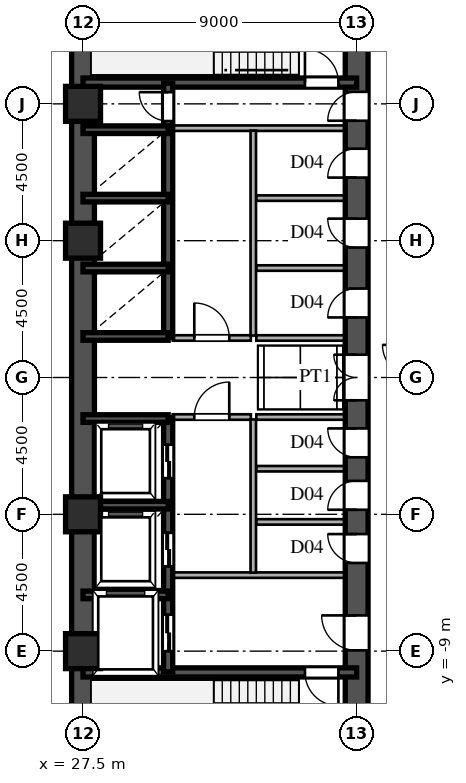
"""IFC4 building model, lengths in metres.
Left out: names, types, materials, properties, quantities, classifications, styles, units other than length and angle.
Written with IfcOpenShell. Run it as: python <this file> out.ifc"""

import sys

from ifc_helpers import new_model, si_unit, direction, frame, frame_2d, origin, origin_2d, place, context, subcontext, project, spatial, rectangle, hollow_rectangle, extrude, source, transform, mapped, element, fill, save


model = new_model("IFC4")
c1 = context("Model", 3, precision=1e-05, world=origin(), true_north=direction((0.0, 1.0)))
c2 = subcontext(c1, "Body", "Model", "MODEL_VIEW")
j1 = project(units=[si_unit("LENGTHUNIT", "METRE"), si_unit("PLANEANGLEUNIT", "RADIAN")], contexts=[c1])
p1 = place(None, origin())
s1 = spatial("IfcSite", under=j1, at=p1, CompositionType="ELEMENT")
p2 = place(p1, origin())
s2 = spatial("IfcBuilding", under=s1, at=p2, CompositionType="ELEMENT")
p3 = place(p2, frame((0.0, 0.0, 33.3)))
s3 = spatial("IfcBuildingStorey", under=s2, at=p3, CompositionType="ELEMENT", Elevation=33.3)
m1 = source(origin(), c2, "Body", "SweptSolid", [
    extrude(hollow_rectangle(XDim=1.15, YDim=1.15, WallThickness=0.048, at=origin_2d()), origin(), (0.0, 0.0, 1.0), 3.6),
])
for number, where, z_axis, x_axis in (
    (1, (27.5, -9.0, 0.0), (0.0, 0.0, 1.0), (1.0, 0.0, 0.0)),
    (2, (27.5, -4.5, 0.0), (0.0, 0.0, 1.0), (1.0, 0.0, 0.0)),
    (3, (27.5, 4.5, 0.0), (0.0, 0.0, 1.0), (1.0, 0.0, 0.0)),
    (4, (27.5, 9.0, 0.0), (0.0, 0.0, 1.0), (1.0, 0.0, 0.0)),
):
    element("IfcColumn", number, at=place(p3, frame(where, z_axis=z_axis, x_axis=x_axis)), inside=s3, PredefinedType="COLUMN", context=c2, shape_type="MappedRepresentation", body=[
        mapped(m1, transform((0.0, 0.0, 0.0), scale=1.0)),
    ])
for number, where, z_axis, x_axis in (
    (5, (27.5, -13.5, 0.0), (0.0, 0.0, 1.0), (0.0, 1.0, 0.0)),
    (6, (27.5, 1.3, 0.0), (0.0, 0.0, 1.0), (0.0, 1.0, 0.0)),
):
    element("IfcWall", number, at=place(p3, frame(where, z_axis=z_axis, x_axis=x_axis)), inside=s3, PredefinedType="SHEAR", context=c2, shape_type="SweptSolid", body=[
        extrude(rectangle(XDim=12.2, YDim=0.75, at=frame_2d((6.1, 0.0))), origin(), (0.0, 0.0, 1.0), 3.38),
    ])
p4 = place(p3, frame((27.5, -1.3, 0.0), z_axis=(0.0, 0.0, 1.0), x_axis=(0.0, 1.0, 0.0)))
e7 = element("IfcWall", 7, at=p4, inside=s3, PredefinedType="SHEAR", context=c2, shape_type="SweptSolid", body=[
    extrude(rectangle(XDim=2.6, YDim=0.75, at=frame_2d((1.3, 0.0))), origin(), (0.0, 0.0, 1.0), 3.38),
])
p5 = place(p3, frame((36.5, -13.65, 0.0), z_axis=(0.0, 0.0, 1.0), x_axis=(0.0, 1.0, 0.0)))
e8 = element("IfcWall", 8, at=p5, inside=s3, PredefinedType="SHEAR", context=c2, shape_type="SweptSolid", body=[
    extrude(rectangle(XDim=7.15, YDim=0.75, at=frame_2d((3.575, 0.0))), origin(), (0.0, 0.0, 1.0), 3.38),
])
p6 = place(p5, frame((4.675, 0.0, 0.0)))
e9 = element("IfcOpeningElement", 9, at=p6, cuts=e8, PredefinedType="OPENING", context=c2, shape_type="SweptSolid", body=[
    extrude(rectangle(XDim=1.15, YDim=2.2, at=frame_2d((0.575, 1.1))), frame((0.0, 0.385, 0.0), z_axis=(0.0, -1.0, 0.0), x_axis=(1.0, 0.0, 0.0)), (0.0, 0.0, 1.0), 0.77),
])
p7 = place(p3, frame((36.5, -1.3, 0.0), z_axis=(0.0, 0.0, 1.0), x_axis=(0.0, 1.0, 0.0)))
e10 = element("IfcWall", 10, at=p7, inside=s3, PredefinedType="SHEAR", context=c2, shape_type="SweptSolid", body=[
    extrude(rectangle(XDim=2.6, YDim=0.75, at=frame_2d((1.3, 0.0))), origin(), (0.0, 0.0, 1.0), 3.38),
])
p8 = place(p7, frame((0.55, 0.0, 0.0)))
e11 = element("IfcOpeningElement", 11, at=p8, cuts=e10, PredefinedType="OPENING", context=c2, shape_type="SweptSolid", body=[
    extrude(rectangle(XDim=1.5, YDim=2.3, at=frame_2d((0.75, 1.15))), frame((0.0, 0.385, 0.0), z_axis=(0.0, -1.0, 0.0), x_axis=(1.0, 0.0, 0.0)), (0.0, 0.0, 1.0), 0.77),
])
p9 = place(p3, frame((36.5, 8.2, 0.0), z_axis=(0.0, 0.0, 1.0), x_axis=(0.0, 1.0, 0.0)))
e12 = element("IfcWall", 12, at=p9, inside=s3, PredefinedType="SHEAR", context=c2, shape_type="SweptSolid", body=[
    extrude(rectangle(XDim=5.45, YDim=0.75, at=frame_2d((2.725, 0.0))), origin(), (0.0, 0.0, 1.0), 3.38),
])
p10 = place(p9, frame((0.245, 0.0, 0.0)))
e13 = element("IfcOpeningElement", 13, at=p10, cuts=e12, PredefinedType="OPENING", context=c2, shape_type="SweptSolid", body=[
    extrude(rectangle(XDim=0.95, YDim=2.15, at=frame_2d((0.475, 1.075))), frame((0.0, 0.385, 0.0), z_axis=(0.0, -1.0, 0.0), x_axis=(1.0, 0.0, 0.0)), (0.0, 0.0, 1.0), 0.77),
])
p11 = place(p3, frame((36.5, -6.5, 0.0), z_axis=(0.0, 0.0, 1.0), x_axis=(0.0, 1.0, 0.0)))
e14 = element("IfcWall", 14, at=p11, inside=s3, PredefinedType="SHEAR", context=c2, shape_type="SweptSolid", body=[
    extrude(rectangle(XDim=1.75, YDim=0.75, at=frame_2d((0.875, 0.0))), origin(), (0.0, 0.0, 1.0), 3.38),
])
p12 = place(p11, frame((0.4, 0.0, 0.0)))
e15 = element("IfcOpeningElement", 15, at=p12, cuts=e14, PredefinedType="OPENING", context=c2, shape_type="SweptSolid", body=[
    extrude(rectangle(XDim=0.95, YDim=2.15, at=frame_2d((0.475, 1.075))), frame((0.0, 0.385, 0.0), z_axis=(0.0, -1.0, 0.0), x_axis=(1.0, 0.0, 0.0)), (0.0, 0.0, 1.0), 0.77),
])
p13 = place(p3, frame((36.5, -4.75, 0.0), z_axis=(0.0, 0.0, 1.0), x_axis=(0.0, 1.0, 0.0)))
e16 = element("IfcWall", 16, at=p13, inside=s3, PredefinedType="SHEAR", context=c2, shape_type="SweptSolid", body=[
    extrude(rectangle(XDim=1.75, YDim=0.75, at=frame_2d((0.875, 0.0))), origin(), (0.0, 0.0, 1.0), 3.38),
])
p14 = place(p13, frame((0.4, 0.0, 0.0)))
e17 = element("IfcOpeningElement", 17, at=p14, cuts=e16, PredefinedType="OPENING", context=c2, shape_type="SweptSolid", body=[
    extrude(rectangle(XDim=0.95, YDim=2.15, at=frame_2d((0.475, 1.075))), frame((0.0, 0.385, 0.0), z_axis=(0.0, -1.0, 0.0), x_axis=(1.0, 0.0, 0.0)), (0.0, 0.0, 1.0), 0.77),
])
p15 = place(p3, frame((36.5, -3.0, 0.0), z_axis=(0.0, 0.0, 1.0), x_axis=(0.0, 1.0, 0.0)))
e18 = element("IfcWall", 18, at=p15, inside=s3, PredefinedType="SHEAR", context=c2, shape_type="SweptSolid", body=[
    extrude(rectangle(XDim=1.7, YDim=0.75, at=frame_2d((0.85, 0.0))), origin(), (0.0, 0.0, 1.0), 3.38),
])
p16 = place(p15, frame((0.375, 0.0, 0.0)))
e19 = element("IfcOpeningElement", 19, at=p16, cuts=e18, PredefinedType="OPENING", context=c2, shape_type="SweptSolid", body=[
    extrude(rectangle(XDim=0.95, YDim=2.15, at=frame_2d((0.475, 1.075))), frame((0.0, 0.385, 0.0), z_axis=(0.0, -1.0, 0.0), x_axis=(1.0, 0.0, 0.0)), (0.0, 0.0, 1.0), 0.77),
])
p17 = place(p3, frame((36.5, 1.3, 0.0), z_axis=(0.0, 0.0, 1.0), x_axis=(0.0, 1.0, 0.0)))
e20 = element("IfcWall", 20, at=p17, inside=s3, PredefinedType="SHEAR", context=c2, shape_type="SweptSolid", body=[
    extrude(rectangle(XDim=2.3, YDim=0.75, at=frame_2d((1.15, 0.0))), origin(), (0.0, 0.0, 1.0), 3.38),
])
p18 = place(p17, frame((0.675, 0.0, 0.0)))
e21 = element("IfcOpeningElement", 21, at=p18, cuts=e20, PredefinedType="OPENING", context=c2, shape_type="SweptSolid", body=[
    extrude(rectangle(XDim=0.95, YDim=2.15, at=frame_2d((0.475, 1.075))), frame((0.0, 0.385, 0.0), z_axis=(0.0, -1.0, 0.0), x_axis=(1.0, 0.0, 0.0)), (0.0, 0.0, 1.0), 0.77),
])
p19 = place(p3, frame((36.5, 3.6, 0.0), z_axis=(0.0, 0.0, 1.0), x_axis=(0.0, 1.0, 0.0)))
e22 = element("IfcWall", 22, at=p19, inside=s3, PredefinedType="SHEAR", context=c2, shape_type="SweptSolid", body=[
    extrude(rectangle(XDim=2.3, YDim=0.75, at=frame_2d((1.15, 0.0))), origin(), (0.0, 0.0, 1.0), 3.38),
])
p20 = place(p19, frame((0.675, 0.0, 0.0)))
e23 = element("IfcOpeningElement", 23, at=p20, cuts=e22, PredefinedType="OPENING", context=c2, shape_type="SweptSolid", body=[
    extrude(rectangle(XDim=0.95, YDim=2.15, at=frame_2d((0.475, 1.075))), frame((0.0, 0.385, 0.0), z_axis=(0.0, -1.0, 0.0), x_axis=(1.0, 0.0, 0.0)), (0.0, 0.0, 1.0), 0.77),
])
p21 = place(p3, frame((36.5, 5.9, 0.0), z_axis=(0.0, 0.0, 1.0), x_axis=(0.0, 1.0, 0.0)))
e24 = element("IfcWall", 24, at=p21, inside=s3, PredefinedType="SHEAR", context=c2, shape_type="SweptSolid", body=[
    extrude(rectangle(XDim=2.3, YDim=0.75, at=frame_2d((1.15, 0.0))), origin(), (0.0, 0.0, 1.0), 3.38),
])
p22 = place(p21, frame((0.675, 0.0, 0.0)))
e25 = element("IfcOpeningElement", 25, at=p22, cuts=e24, PredefinedType="OPENING", context=c2, shape_type="SweptSolid", body=[
    extrude(rectangle(XDim=0.95, YDim=2.15, at=frame_2d((0.475, 1.075))), frame((0.0, 0.385, 0.0), z_axis=(0.0, -1.0, 0.0), x_axis=(1.0, 0.0, 0.0)), (0.0, 0.0, 1.0), 0.77),
])
p23 = place(p3, frame((27.5, -9.7, 0.0), z_axis=(0.0, 0.0, 1.0), x_axis=(1.0, 0.0, 0.0)))
e26 = element("IfcWall", 26, at=p23, inside=s3, PredefinedType="SHEAR", context=c2, shape_type="SweptSolid", body=[
    extrude(rectangle(XDim=9.0, YDim=0.3, at=frame_2d((4.5, 0.0))), origin(), (0.0, 0.0, 1.0), 3.38),
])
p24 = place(p23, frame((7.3, 0.0, 0.0)))
e27 = element("IfcOpeningElement", 27, at=p24, cuts=e26, PredefinedType="OPENING", context=c2, shape_type="SweptSolid", body=[
    extrude(rectangle(XDim=1.1, YDim=2.2, at=frame_2d((0.55, 1.1))), frame((0.0, 0.16, 0.0), z_axis=(0.0, -1.0, 0.0), x_axis=(1.0, 0.0, 0.0)), (0.0, 0.0, 1.0), 0.32),
])
p25 = place(p3, frame((27.5, 9.7, 0.0), z_axis=(0.0, 0.0, 1.0), x_axis=(1.0, 0.0, 0.0)))
e28 = element("IfcWall", 28, at=p25, inside=s3, PredefinedType="SHEAR", context=c2, shape_type="SweptSolid", body=[
    extrude(rectangle(XDim=9.0, YDim=0.3, at=frame_2d((4.5, 0.0))), origin(), (0.0, 0.0, 1.0), 3.38),
])
p26 = place(p25, frame((7.3, 0.0, 0.0)))
e29 = element("IfcOpeningElement", 29, at=p26, cuts=e28, PredefinedType="OPENING", context=c2, shape_type="SweptSolid", body=[
    extrude(rectangle(XDim=1.1, YDim=2.2, at=frame_2d((0.55, 1.1))), frame((0.0, 0.16, 0.0), z_axis=(0.0, -1.0, 0.0), x_axis=(1.0, 0.0, 0.0)), (0.0, 0.0, 1.0), 0.32),
])
for number, where, z_axis, x_axis in (
    (30, (27.5, -7.15, 0.0), (0.0, 0.0, 1.0), (1.0, 0.0, 0.0)),
    (31, (27.5, -4.2, 0.0), (0.0, 0.0, 1.0), (1.0, 0.0, 0.0)),
    (32, (27.5, -1.35, 0.0), (0.0, 0.0, 1.0), (1.0, 0.0, 0.0)),
    (33, (27.5, 1.35, 0.0), (0.0, 0.0, 1.0), (1.0, 0.0, 0.0)),
    (34, (27.5, 3.6, 0.0), (0.0, 0.0, 1.0), (1.0, 0.0, 0.0)),
    (35, (27.5, 5.9, 0.0), (0.0, 0.0, 1.0), (1.0, 0.0, 0.0)),
    (36, (27.5, 8.15, 0.0), (0.0, 0.0, 1.0), (1.0, 0.0, 0.0)),
):
    element("IfcWall", number, at=place(p3, frame(where, z_axis=z_axis, x_axis=x_axis)), inside=s3, PredefinedType="SHEAR", context=c2, shape_type="SweptSolid", body=[
        extrude(rectangle(XDim=2.8, YDim=0.25, at=frame_2d((1.4, 0.0))), origin(), (0.0, 0.0, 1.0), 3.38),
    ])
p27 = place(p3, frame((30.3, -9.68, 0.0), z_axis=(0.0, 0.0, 1.0), x_axis=(0.0, 1.0, 0.0)))
e37 = element("IfcWall", 37, at=p27, inside=s3, PredefinedType="SHEAR", context=c2, shape_type="SweptSolid", body=[
    extrude(rectangle(XDim=2.56, YDim=0.3, at=frame_2d((1.28, 0.0))), origin(), (0.0, 0.0, 1.0), 3.38),
])
p28 = place(p27, frame((0.68, 0.0, 0.0)))
e38 = element("IfcOpeningElement", 38, at=p28, cuts=e37, PredefinedType="OPENING", context=c2, shape_type="SweptSolid", body=[
    extrude(rectangle(XDim=1.2, YDim=2.25, at=frame_2d((0.6, 1.125))), frame((0.0, 0.16, 0.0), z_axis=(0.0, -1.0, 0.0), x_axis=(1.0, 0.0, 0.0)), (0.0, 0.0, 1.0), 0.32),
])
p29 = place(p3, frame((30.3, -7.12, 0.0), z_axis=(0.0, 0.0, 1.0), x_axis=(0.0, 1.0, 0.0)))
e39 = element("IfcWall", 39, at=p29, inside=s3, PredefinedType="SHEAR", context=c2, shape_type="SweptSolid", body=[
    extrude(rectangle(XDim=2.92, YDim=0.3, at=frame_2d((1.46, 0.0))), origin(), (0.0, 0.0, 1.0), 3.38),
])
p30 = place(p29, frame((0.91, 0.0, 0.0)))
e40 = element("IfcOpeningElement", 40, at=p30, cuts=e39, PredefinedType="OPENING", context=c2, shape_type="SweptSolid", body=[
    extrude(rectangle(XDim=1.1, YDim=2.2, at=frame_2d((0.55, 1.1))), frame((0.0, 0.16, 0.0), z_axis=(0.0, -1.0, 0.0), x_axis=(1.0, 0.0, 0.0)), (0.0, 0.0, 1.0), 0.32),
])
p31 = place(p3, frame((30.3, -4.2, 0.0), z_axis=(0.0, 0.0, 1.0), x_axis=(0.0, 1.0, 0.0)))
e41 = element("IfcWall", 41, at=p31, inside=s3, PredefinedType="SHEAR", context=c2, shape_type="SweptSolid", body=[
    extrude(rectangle(XDim=2.88, YDim=0.3, at=frame_2d((1.44, 0.0))), origin(), (0.0, 0.0, 1.0), 3.38),
])
p32 = place(p31, frame((0.89, 0.0, 0.0)))
e42 = element("IfcOpeningElement", 42, at=p32, cuts=e41, PredefinedType="OPENING", context=c2, shape_type="SweptSolid", body=[
    extrude(rectangle(XDim=1.1, YDim=2.2, at=frame_2d((0.55, 1.1))), frame((0.0, 0.16, 0.0), z_axis=(0.0, -1.0, 0.0), x_axis=(1.0, 0.0, 0.0)), (0.0, 0.0, 1.0), 0.32),
])
p33 = place(p3, frame((30.3, 1.32, 0.0), z_axis=(0.0, 0.0, 1.0), x_axis=(0.0, 1.0, 0.0)))
e43 = element("IfcWall", 43, at=p33, inside=s3, PredefinedType="SHEAR", context=c2, shape_type="SweptSolid", body=[
    extrude(rectangle(XDim=2.28, YDim=0.3, at=frame_2d((1.14, 0.0))), origin(), (0.0, 0.0, 1.0), 3.38),
])
p34 = place(p3, frame((30.3, 3.6, 0.0), z_axis=(0.0, 0.0, 1.0), x_axis=(0.0, 1.0, 0.0)))
e44 = element("IfcWall", 44, at=p34, inside=s3, PredefinedType="SHEAR", context=c2, shape_type="SweptSolid", body=[
    extrude(rectangle(XDim=2.3, YDim=0.3, at=frame_2d((1.15, 0.0))), origin(), (0.0, 0.0, 1.0), 3.38),
])
p35 = place(p3, frame((30.3, 5.9, 0.0), z_axis=(0.0, 0.0, 1.0), x_axis=(0.0, 1.0, 0.0)))
e45 = element("IfcWall", 45, at=p35, inside=s3, PredefinedType="SHEAR", context=c2, shape_type="SweptSolid", body=[
    extrude(rectangle(XDim=2.25, YDim=0.3, at=frame_2d((1.125, 0.0))), origin(), (0.0, 0.0, 1.0), 3.38),
])
p36 = place(p3, frame((30.3, 8.15, 0.0), z_axis=(0.0, 0.0, 1.0), x_axis=(0.0, 1.0, 0.0)))
e46 = element("IfcWall", 46, at=p36, inside=s3, PredefinedType="SHEAR", context=c2, shape_type="SweptSolid", body=[
    extrude(rectangle(XDim=1.53, YDim=0.3, at=frame_2d((0.765, 0.0))), origin(), (0.0, 0.0, 1.0), 3.38),
])
p37 = place(p36, frame((0.285, 0.0, 0.0)))
e47 = element("IfcOpeningElement", 47, at=p37, cuts=e46, PredefinedType="OPENING", context=c2, shape_type="SweptSolid", body=[
    extrude(rectangle(XDim=0.95, YDim=2.15, at=frame_2d((0.475, 1.075))), frame((0.0, 0.16, 0.0), z_axis=(0.0, -1.0, 0.0), x_axis=(1.0, 0.0, 0.0)), (0.0, 0.0, 1.0), 0.32),
])
for number, where, z_axis, x_axis in (
    (48, (30.45, -6.5, 0.0), (0.0, 0.0, 1.0), (1.0, 0.0, 0.0)),
    (49, (30.45, 8.2, 0.0), (0.0, 0.0, 1.0), (1.0, 0.0, 0.0)),
):
    element("IfcWall", number, at=place(p3, frame(where, z_axis=z_axis, x_axis=x_axis)), inside=s3, PredefinedType="PARTITIONING", context=c2, shape_type="SweptSolid", body=[
        extrude(rectangle(XDim=5.7, YDim=0.18, at=frame_2d((2.85, 0.0))), origin(), (0.0, 0.0, 1.0), 3.38),
    ])
p38 = place(p3, frame((33.1, -6.42, 0.0), z_axis=(0.0, 0.0, 1.0), x_axis=(0.0, 1.0, 0.0)))
e50 = element("IfcWall", 50, at=p38, inside=s3, PredefinedType="PARTITIONING", context=c2, shape_type="SweptSolid", body=[
    extrude(rectangle(XDim=5.04, YDim=0.18, at=frame_2d((2.52, 0.0))), origin(), (0.0, 0.0, 1.0), 3.38),
])
p39 = place(p3, frame((33.1, 1.38, 0.0), z_axis=(0.0, 0.0, 1.0), x_axis=(0.0, 1.0, 0.0)))
e51 = element("IfcWall", 51, at=p39, inside=s3, PredefinedType="PARTITIONING", context=c2, shape_type="SweptSolid", body=[
    extrude(rectangle(XDim=6.74, YDim=0.18, at=frame_2d((3.37, 0.0))), origin(), (0.0, 0.0, 1.0), 3.38),
])
p40 = place(p3, frame((30.45, -1.3, 0.0), z_axis=(0.0, 0.0, 1.0), x_axis=(1.0, 0.0, 0.0)))
e52 = element("IfcWall", 52, at=p40, inside=s3, PredefinedType="PARTITIONING", context=c2, shape_type="SweptSolid", body=[
    extrude(rectangle(XDim=2.57, YDim=0.18, at=frame_2d((1.285, 0.0))), origin(), (0.0, 0.0, 1.0), 3.38),
])
p41 = place(p40, frame((0.71, 0.0, 0.0)))
e53 = element("IfcOpeningElement", 53, at=p41, cuts=e52, PredefinedType="OPENING", context=c2, shape_type="SweptSolid", body=[
    extrude(rectangle(XDim=1.15, YDim=2.2, at=frame_2d((0.575, 1.1))), frame((0.0, 0.1, 0.0), z_axis=(0.0, -1.0, 0.0), x_axis=(1.0, 0.0, 0.0)), (0.0, 0.0, 1.0), 0.2),
])
p42 = place(p3, frame((30.45, 1.3, 0.0), z_axis=(0.0, 0.0, 1.0), x_axis=(1.0, 0.0, 0.0)))
e54 = element("IfcWall", 54, at=p42, inside=s3, PredefinedType="PARTITIONING", context=c2, shape_type="SweptSolid", body=[
    extrude(rectangle(XDim=2.57, YDim=0.18, at=frame_2d((1.285, 0.0))), origin(), (0.0, 0.0, 1.0), 3.38),
])
p43 = place(p42, frame((0.71, 0.0, 0.0)))
e55 = element("IfcOpeningElement", 55, at=p43, cuts=e54, PredefinedType="OPENING", context=c2, shape_type="SweptSolid", body=[
    extrude(rectangle(XDim=1.15, YDim=2.2, at=frame_2d((0.575, 1.1))), frame((0.0, 0.1, 0.0), z_axis=(0.0, -1.0, 0.0), x_axis=(1.0, 0.0, 0.0)), (0.0, 0.0, 1.0), 0.2),
])
for number, where, z_axis, x_axis in (
    (56, (33.2, -1.3, 0.0), (0.0, 0.0, 1.0), (1.0, 0.0, 0.0)),
    (57, (33.2, 1.3, 0.0), (0.0, 0.0, 1.0), (1.0, 0.0, 0.0)),
    (58, (33.2, -4.75, 0.0), (0.0, 0.0, 1.0), (1.0, 0.0, 0.0)),
    (59, (33.2, -3.0, 0.0), (0.0, 0.0, 1.0), (1.0, 0.0, 0.0)),
    (60, (33.2, 3.6, 0.0), (0.0, 0.0, 1.0), (1.0, 0.0, 0.0)),
    (61, (33.2, 5.9, 0.0), (0.0, 0.0, 1.0), (1.0, 0.0, 0.0)),
):
    element("IfcWall", number, at=place(p3, frame(where, z_axis=z_axis, x_axis=x_axis)), inside=s3, PredefinedType="PARTITIONING", context=c2, shape_type="SweptSolid", body=[
        extrude(rectangle(XDim=2.95, YDim=0.18, at=frame_2d((1.475, 0.0))), origin(), (0.0, 0.0, 1.0), 3.38),
    ])
m2 = source(origin(), c2, "Body", "SweptSolid", [
    extrude(rectangle(XDim=1.15, YDim=2.2, at=frame_2d((0.575, 1.1))), frame((0.0, 0.025, 0.0), z_axis=(0.0, -1.0, 0.0), x_axis=(1.0, 0.0, 0.0)), (0.0, 0.0, 1.0), 0.05),
])
p44 = place(p6, origin())
e62 = element("IfcDoor", 62, at=p44, inside=s3, OperationType="SINGLE_SWING_RIGHT", PredefinedType="DOOR", context=c2, shape_type="MappedRepresentation", body=[
    mapped(m2, transform((0.0, 0.0, 0.0), scale=1.0)),
])
fill(e9, e62)
m3 = source(origin(), c2, "Body", "SweptSolid", [
    extrude(rectangle(XDim=1.5, YDim=2.3, at=frame_2d((0.75, 1.15))), frame((0.0, 0.025, 0.0), z_axis=(0.0, -1.0, 0.0), x_axis=(1.0, 0.0, 0.0)), (0.0, 0.0, 1.0), 0.05),
])
p45 = place(p8, origin())
e63 = element("IfcDoor", 63, at=p45, inside=s3, OperationType="DOUBLE_SWING_LEFT", PredefinedType="DOOR", context=c2, shape_type="MappedRepresentation", body=[
    mapped(m3, transform((0.0, 0.0, 0.0), scale=1.0)),
])
fill(e11, e63)
m4 = source(origin(), c2, "Body", "SweptSolid", [
    extrude(rectangle(XDim=0.95, YDim=2.15, at=frame_2d((0.475, 1.075))), frame((0.0, 0.025, 0.0), z_axis=(0.0, -1.0, 0.0), x_axis=(1.0, 0.0, 0.0)), (0.0, 0.0, 1.0), 0.05),
])
p46 = place(p10, origin())
e64 = element("IfcDoor", 64, at=p46, inside=s3, OperationType="SINGLE_SWING_LEFT", PredefinedType="DOOR", context=c2, shape_type="MappedRepresentation", body=[
    mapped(m4, transform((0.0, 0.0, 0.0), scale=1.0)),
])
fill(e13, e64)
p47 = place(p12, origin())
e65 = element("IfcDoor", 65, at=p47, inside=s3, OperationType="SINGLE_SWING_RIGHT", PredefinedType="DOOR", context=c2, shape_type="MappedRepresentation", body=[
    mapped(m4, transform((0.0, 0.0, 0.0), scale=1.0)),
])
fill(e15, e65)
p48 = place(p14, origin())
e66 = element("IfcDoor", 66, at=p48, inside=s3, OperationType="SINGLE_SWING_LEFT", PredefinedType="DOOR", context=c2, shape_type="MappedRepresentation", body=[
    mapped(m4, transform((0.0, 0.0, 0.0), scale=1.0)),
])
fill(e17, e66)
p49 = place(p16, origin())
e67 = element("IfcDoor", 67, at=p49, inside=s3, OperationType="SINGLE_SWING_RIGHT", PredefinedType="DOOR", context=c2, shape_type="MappedRepresentation", body=[
    mapped(m4, transform((0.0, 0.0, 0.0), scale=1.0)),
])
fill(e19, e67)
p50 = place(p18, origin())
e68 = element("IfcDoor", 68, at=p50, inside=s3, OperationType="SINGLE_SWING_LEFT", PredefinedType="DOOR", context=c2, shape_type="MappedRepresentation", body=[
    mapped(m4, transform((0.0, 0.0, 0.0), scale=1.0)),
])
fill(e21, e68)
p51 = place(p20, origin())
e69 = element("IfcDoor", 69, at=p51, inside=s3, OperationType="SINGLE_SWING_RIGHT", PredefinedType="DOOR", context=c2, shape_type="MappedRepresentation", body=[
    mapped(m4, transform((0.0, 0.0, 0.0), scale=1.0)),
])
fill(e23, e69)
p52 = place(p22, origin())
e70 = element("IfcDoor", 70, at=p52, inside=s3, OperationType="SINGLE_SWING_LEFT", PredefinedType="DOOR", context=c2, shape_type="MappedRepresentation", body=[
    mapped(m4, transform((0.0, 0.0, 0.0), scale=1.0)),
])
fill(e25, e70)
m5 = source(origin(), c2, "Body", "SweptSolid", [
    extrude(rectangle(XDim=1.1, YDim=2.2, at=frame_2d((0.55, 1.1))), frame((0.0, 0.025, 0.0), z_axis=(0.0, -1.0, 0.0), x_axis=(1.0, 0.0, 0.0)), (0.0, 0.0, 1.0), 0.05),
])
p53 = place(p24, frame((1.1, 0.0, 0.0), z_axis=(0.0, 0.0, 1.0), x_axis=(-1.0, 0.0, 0.0)))
e71 = element("IfcDoor", 71, at=p53, inside=s3, OperationType="SINGLE_SWING_RIGHT", PredefinedType="DOOR", context=c2, shape_type="MappedRepresentation", body=[
    mapped(m5, transform((0.0, 0.0, 0.0), scale=1.0)),
])
fill(e27, e71)
p54 = place(p26, origin())
e72 = element("IfcDoor", 72, at=p54, inside=s3, OperationType="SINGLE_SWING_LEFT", PredefinedType="DOOR", context=c2, shape_type="MappedRepresentation", body=[
    mapped(m5, transform((0.0, 0.0, 0.0), scale=1.0)),
])
fill(e29, e72)
m6 = source(origin(), c2, "Body", "SweptSolid", [
    extrude(rectangle(XDim=1.2, YDim=2.25, at=frame_2d((0.6, 1.125))), frame((0.0, 0.025, 0.0), z_axis=(0.0, -1.0, 0.0), x_axis=(1.0, 0.0, 0.0)), (0.0, 0.0, 1.0), 0.05),
])
p55 = place(p28, origin())
e73 = element("IfcDoor", 73, at=p55, inside=s3, OperationType="DOUBLE_DOOR_SLIDING", PredefinedType="DOOR", context=c2, shape_type="MappedRepresentation", body=[
    mapped(m6, transform((0.0, 0.0, 0.0), scale=1.0)),
])
fill(e38, e73)
m7 = source(origin(), c2, "Body", "SweptSolid", [
    extrude(rectangle(XDim=1.1, YDim=2.2, at=frame_2d((0.55, 1.1))), frame((0.0, 0.025, 0.0), z_axis=(0.0, -1.0, 0.0), x_axis=(1.0, 0.0, 0.0)), (0.0, 0.0, 1.0), 0.05),
])
p56 = place(p30, origin())
e74 = element("IfcDoor", 74, at=p56, inside=s3, OperationType="DOUBLE_DOOR_SLIDING", PredefinedType="DOOR", context=c2, shape_type="MappedRepresentation", body=[
    mapped(m7, transform((0.0, 0.0, 0.0), scale=1.0)),
])
fill(e40, e74)
p57 = place(p32, origin())
e75 = element("IfcDoor", 75, at=p57, inside=s3, OperationType="DOUBLE_DOOR_SLIDING", PredefinedType="DOOR", context=c2, shape_type="MappedRepresentation", body=[
    mapped(m7, transform((0.0, 0.0, 0.0), scale=1.0)),
])
fill(e42, e75)
p58 = place(p37, origin())
e76 = element("IfcDoor", 76, at=p58, inside=s3, OperationType="SINGLE_SWING_RIGHT", PredefinedType="DOOR", context=c2, shape_type="MappedRepresentation", body=[
    mapped(m4, transform((0.0, 0.0, 0.0), scale=1.0)),
])
fill(e47, e76)
p59 = place(p41, origin())
e77 = element("IfcDoor", 77, at=p59, inside=s3, OperationType="SINGLE_SWING_RIGHT", PredefinedType="DOOR", context=c2, shape_type="MappedRepresentation", body=[
    mapped(m2, transform((0.0, 0.0, 0.0), scale=1.0)),
])
fill(e53, e77)
p60 = place(p43, origin())
e78 = element("IfcDoor", 78, at=p60, inside=s3, OperationType="SINGLE_SWING_LEFT", PredefinedType="DOOR", context=c2, shape_type="MappedRepresentation", body=[
    mapped(m2, transform((0.0, 0.0, 0.0), scale=1.0)),
])
fill(e55, e78)
save(model, sys.argv[1])
